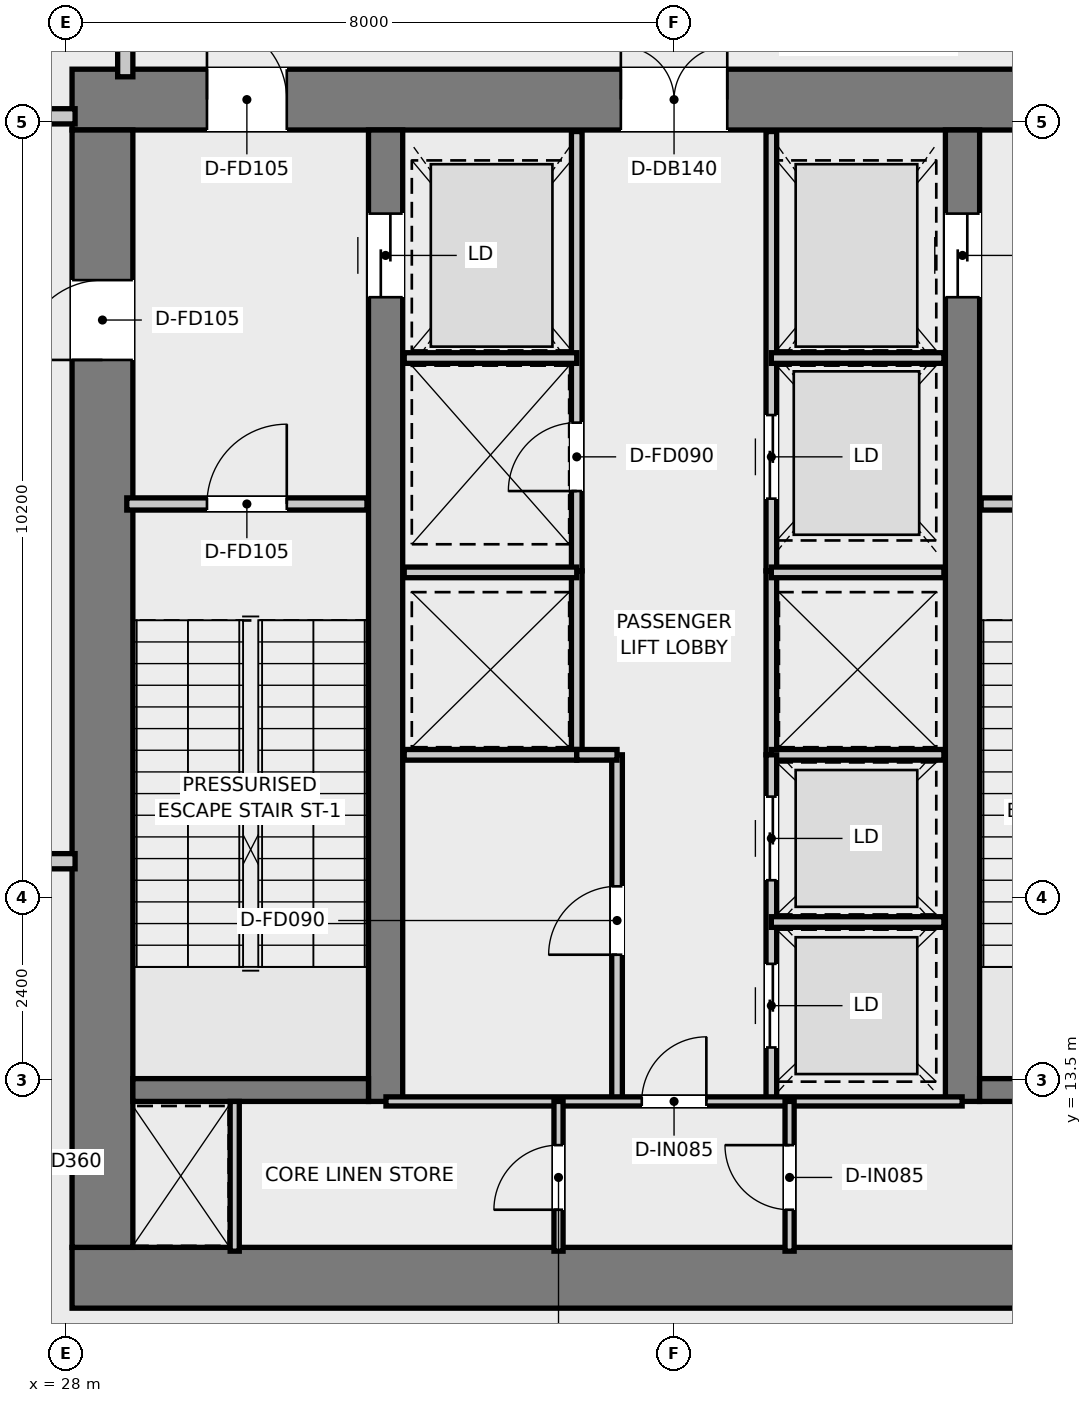
"""IFC4 building model, lengths in metres.
Left out: names, types, materials, properties, quantities, classifications, styles, units other than length and angle.
Written with IfcOpenShell. Run it as: python <this file> out.ifc"""

import sys

from ifc_helpers import new_model, si_unit, direction, frame, frame_2d, origin, place, context, subcontext, project, spatial, rectangle, extrude, element, fill, save


model = new_model("IFC4")
c1 = context("Model", 3, precision=1e-05, world=origin(), true_north=direction((0.0, 1.0)))
c2 = subcontext(c1, "Body", "Model", "MODEL_VIEW")
j1 = project(units=[si_unit("LENGTHUNIT", "METRE"), si_unit("PLANEANGLEUNIT", "RADIAN")], contexts=[c1])
p1 = place(None, origin())
s1 = spatial("IfcSite", under=j1, at=p1, CompositionType="ELEMENT")
p2 = place(p1, origin())
s2 = spatial("IfcBuilding", under=s1, at=p2, CompositionType="ELEMENT")
p3 = place(p2, frame((0.0, 0.0, 201.5)))
s3 = spatial("IfcBuildingStorey", under=s2, at=p3, CompositionType="ELEMENT", Elevation=201.5)
p4 = place(p3, frame((28.08, 10.9, 0.0), z_axis=(0.0, 0.0, 1.0), x_axis=(1.0, 0.0, 0.0)))
e1 = element("IfcWall", 1, at=p4, inside=s3, PredefinedType="SHEAR", context=c2, shape_type="SweptSolid", body=[
    extrude(rectangle(XDim=15.84, YDim=0.8, at=frame_2d((7.92, 0.0))), origin(), (0.0, 0.0, 1.0), 5.8),
])
p5 = place(p3, frame((28.08, 26.4, 0.0), z_axis=(0.0, 0.0, 1.0), x_axis=(1.0, 0.0, 0.0)))
e2 = element("IfcWall", 2, at=p5, inside=s3, PredefinedType="SHEAR", context=c2, shape_type="SweptSolid", body=[
    extrude(rectangle(XDim=15.84, YDim=0.8, at=frame_2d((7.92, 0.0))), origin(), (0.0, 0.0, 1.0), 5.8),
])
p6 = place(p5, frame((7.22, 0.0, 0.0)))
e3 = element("IfcOpeningElement", 3, at=p6, cuts=e2, PredefinedType="OPENING", context=c2, shape_type="SweptSolid", body=[
    extrude(rectangle(XDim=1.4, YDim=2.2, at=frame_2d((0.7, 1.1))), frame((0.0, 0.41, 0.0), z_axis=(0.0, -1.0, 0.0), x_axis=(1.0, 0.0, 0.0)), (0.0, 0.0, 1.0), 0.82),
])
p7 = place(p5, frame((1.775, 0.0, 0.0)))
e4 = element("IfcOpeningElement", 4, at=p7, cuts=e2, PredefinedType="OPENING", context=c2, shape_type="SweptSolid", body=[
    extrude(rectangle(XDim=1.05, YDim=2.1, at=frame_2d((0.525, 1.05))), frame((0.0, 0.41, 0.0), z_axis=(0.0, -1.0, 0.0), x_axis=(1.0, 0.0, 0.0)), (0.0, 0.0, 1.0), 0.82),
])
p8 = place(p5, frame((13.015, 0.0, 0.0)))
e5 = element("IfcOpeningElement", 5, at=p8, cuts=e2, PredefinedType="OPENING", context=c2, shape_type="SweptSolid", body=[
    extrude(rectangle(XDim=1.05, YDim=2.1, at=frame_2d((0.525, 1.05))), frame((0.0, 0.41, 0.0), z_axis=(0.0, -1.0, 0.0), x_axis=(1.0, 0.0, 0.0)), (0.0, 0.0, 1.0), 0.82),
])
p9 = place(p3, frame((28.48, 11.3, 0.0), z_axis=(0.0, 0.0, 1.0), x_axis=(0.0, 1.0, 0.0)))
e6 = element("IfcWall", 6, at=p9, inside=s3, PredefinedType="SHEAR", context=c2, shape_type="SweptSolid", body=[
    extrude(rectangle(XDim=14.7, YDim=0.8, at=frame_2d((7.35, 0.0))), origin(), (0.0, 0.0, 1.0), 5.8),
])
p10 = place(p9, frame((11.675, 0.0, 0.0)))
e7 = element("IfcOpeningElement", 7, at=p10, cuts=e6, PredefinedType="OPENING", context=c2, shape_type="SweptSolid", body=[
    extrude(rectangle(XDim=1.05, YDim=2.1, at=frame_2d((0.525, 1.05))), frame((0.0, 0.41, 0.0), z_axis=(0.0, -1.0, 0.0), x_axis=(1.0, 0.0, 0.0)), (0.0, 0.0, 1.0), 0.82),
])
p11 = place(p3, frame((32.205, 13.22, 0.0), z_axis=(0.0, 0.0, 1.0), x_axis=(0.0, 1.0, 0.0)))
e8 = element("IfcWall", 8, at=p11, inside=s3, PredefinedType="SHEAR", context=c2, shape_type="SweptSolid", body=[
    extrude(rectangle(XDim=12.78, YDim=0.45, at=frame_2d((6.39, 0.0))), origin(), (0.0, 0.0, 1.0), 5.8),
])
p12 = place(p11, frame((10.58, 0.0, 0.0)))
e9 = element("IfcOpeningElement", 9, at=p12, cuts=e8, PredefinedType="OPENING", context=c2, shape_type="SweptSolid", body=[
    extrude(rectangle(XDim=1.1, YDim=2.15, at=frame_2d((0.55, 1.075))), frame((0.0, 0.235, 0.0), z_axis=(0.0, -1.0, 0.0), x_axis=(1.0, 0.0, 0.0)), (0.0, 0.0, 1.0), 0.47),
])
p13 = place(p3, frame((39.795, 13.22, 0.0), z_axis=(0.0, 0.0, 1.0), x_axis=(0.0, 1.0, 0.0)))
e10 = element("IfcWall", 10, at=p13, inside=s3, PredefinedType="SHEAR", context=c2, shape_type="SweptSolid", body=[
    extrude(rectangle(XDim=12.78, YDim=0.45, at=frame_2d((6.39, 0.0))), origin(), (0.0, 0.0, 1.0), 5.8),
])
p14 = place(p13, frame((10.58, 0.0, 0.0)))
e11 = element("IfcOpeningElement", 11, at=p14, cuts=e10, PredefinedType="OPENING", context=c2, shape_type="SweptSolid", body=[
    extrude(rectangle(XDim=1.1, YDim=2.15, at=frame_2d((0.55, 1.075))), frame((0.0, 0.235, 0.0), z_axis=(0.0, -1.0, 0.0), x_axis=(1.0, 0.0, 0.0)), (0.0, 0.0, 1.0), 0.47),
])
for number, where, z_axis, x_axis in (
    (12, (28.88, 13.37, 0.0), (0.0, 0.0, 1.0), (1.0, 0.0, 0.0)),
    (13, (40.02, 13.37, 0.0), (0.0, 0.0, 1.0), (1.0, 0.0, 0.0)),
):
    element("IfcWall", number, at=place(p3, frame(where, z_axis=z_axis, x_axis=x_axis)), inside=s3, PredefinedType="SHEAR", context=c2, shape_type="SweptSolid", body=[
        extrude(rectangle(XDim=3.1, YDim=0.3, at=frame_2d((1.55, 0.0))), origin(), (0.0, 0.0, 1.0), 5.8),
    ])
p15 = place(p3, frame((28.8, 21.08, 0.0), z_axis=(0.0, 0.0, 1.0), x_axis=(1.0, 0.0, 0.0)))
e14 = element("IfcWall", 14, at=p15, inside=s3, PredefinedType="PARTITIONING", context=c2, shape_type="SweptSolid", body=[
    extrude(rectangle(XDim=3.16, YDim=0.16, at=frame_2d((1.58, 0.0))), origin(), (0.0, 0.0, 1.0), 5.52),
])
p16 = place(p15, frame((1.055, 0.0, 0.0)))
e15 = element("IfcOpeningElement", 15, at=p16, cuts=e14, PredefinedType="OPENING", context=c2, shape_type="SweptSolid", body=[
    extrude(rectangle(XDim=1.05, YDim=2.1, at=frame_2d((0.525, 1.05))), frame((0.0, 0.09, 0.0), z_axis=(0.0, -1.0, 0.0), x_axis=(1.0, 0.0, 0.0)), (0.0, 0.0, 1.0), 0.18),
])
p17 = place(p3, frame((40.04, 21.08, 0.0), z_axis=(0.0, 0.0, 1.0), x_axis=(1.0, 0.0, 0.0)))
e16 = element("IfcWall", 16, at=p17, inside=s3, PredefinedType="PARTITIONING", context=c2, shape_type="SweptSolid", body=[
    extrude(rectangle(XDim=3.16, YDim=0.16, at=frame_2d((1.58, 0.0))), origin(), (0.0, 0.0, 1.0), 5.52),
])
p18 = place(p17, frame((1.055, 0.0, 0.0)))
e17 = element("IfcOpeningElement", 17, at=p18, cuts=e16, PredefinedType="OPENING", context=c2, shape_type="SweptSolid", body=[
    extrude(rectangle(XDim=1.05, YDim=2.1, at=frame_2d((0.525, 1.05))), frame((0.0, 0.09, 0.0), z_axis=(0.0, -1.0, 0.0), x_axis=(1.0, 0.0, 0.0)), (0.0, 0.0, 1.0), 0.18),
])
p19 = place(p3, frame((34.72, 20.2, 0.0), z_axis=(0.0, 0.0, 1.0), x_axis=(0.0, 1.0, 0.0)))
e18 = element("IfcWall", 18, at=p19, inside=s3, PredefinedType="PARTITIONING", context=c2, shape_type="SweptSolid", body=[
    extrude(rectangle(XDim=5.78, YDim=0.14, at=frame_2d((2.89, 0.0))), origin(), (0.0, 0.0, 1.0), 4.52),
])
p20 = place(p19, frame((1.05, 0.0, 0.0)))
e19 = element("IfcOpeningElement", 19, at=p20, cuts=e18, PredefinedType="OPENING", context=c2, shape_type="SweptSolid", body=[
    extrude(rectangle(XDim=0.9, YDim=2.1, at=frame_2d((0.45, 1.05))), frame((0.0, 0.08, 0.0), z_axis=(0.0, -1.0, 0.0), x_axis=(1.0, 0.0, 0.0)), (0.0, 0.0, 1.0), 0.16),
])
p21 = place(p3, frame((37.28, 20.2, 0.0), z_axis=(0.0, 0.0, 1.0), x_axis=(0.0, 1.0, 0.0)))
e20 = element("IfcWall", 20, at=p21, inside=s3, PredefinedType="PARTITIONING", context=c2, shape_type="SweptSolid", body=[
    extrude(rectangle(XDim=5.78, YDim=0.14, at=frame_2d((2.89, 0.0))), origin(), (0.0, 0.0, 1.0), 4.52),
])
p22 = place(p21, frame((0.95, 0.0, 0.0)))
e21 = element("IfcOpeningElement", 21, at=p22, cuts=e20, PredefinedType="OPENING", context=c2, shape_type="SweptSolid", body=[
    extrude(rectangle(XDim=1.1, YDim=2.15, at=frame_2d((0.55, 1.075))), frame((0.0, 0.08, 0.0), z_axis=(0.0, -1.0, 0.0), x_axis=(1.0, 0.0, 0.0)), (0.0, 0.0, 1.0), 0.16),
])
for number, where, z_axis, x_axis in (
    (22, (32.45, 23.0, 0.0), (0.0, 0.0, 1.0), (1.0, 0.0, 0.0)),
    (23, (37.28, 23.0, 0.0), (0.0, 0.0, 1.0), (1.0, 0.0, 0.0)),
):
    element("IfcWall", number, at=place(p3, frame(where, z_axis=z_axis, x_axis=x_axis)), inside=s3, PredefinedType="PARTITIONING", context=c2, shape_type="SweptSolid", body=[
        extrude(rectangle(XDim=2.27, YDim=0.14, at=frame_2d((1.135, 0.0))), origin(), (0.0, 0.0, 1.0), 4.52),
    ])
for number, where, z_axis, x_axis in (
    (24, (34.72, 17.78, 0.0), (0.0, 0.0, 1.0), (0.0, 1.0, 0.0)),
    (25, (37.28, 17.78, 0.0), (0.0, 0.0, 1.0), (0.0, 1.0, 0.0)),
):
    element("IfcWall", number, at=place(p3, frame(where, z_axis=z_axis, x_axis=x_axis)), inside=s3, PredefinedType="PARTITIONING", context=c2, shape_type="SweptSolid", body=[
        extrude(rectangle(XDim=2.42, YDim=0.14, at=frame_2d((1.21, 0.0))), origin(), (0.0, 0.0, 1.0), 5.52),
    ])
for number, where, z_axis, x_axis in (
    (26, (32.45, 17.78, 0.0), (0.0, 0.0, 1.0), (1.0, 0.0, 0.0)),
    (27, (32.45, 20.18, 0.0), (0.0, 0.0, 1.0), (1.0, 0.0, 0.0)),
    (28, (37.28, 17.78, 0.0), (0.0, 0.0, 1.0), (1.0, 0.0, 0.0)),
    (29, (37.28, 20.18, 0.0), (0.0, 0.0, 1.0), (1.0, 0.0, 0.0)),
):
    element("IfcWall", number, at=place(p3, frame(where, z_axis=z_axis, x_axis=x_axis)), inside=s3, PredefinedType="PARTITIONING", context=c2, shape_type="SweptSolid", body=[
        extrude(rectangle(XDim=2.27, YDim=0.14, at=frame_2d((1.135, 0.0))), origin(), (0.0, 0.0, 1.0), 5.52),
    ])
p23 = place(p3, frame((35.25, 13.22, 0.0), z_axis=(0.0, 0.0, 1.0), x_axis=(0.0, 1.0, 0.0)))
e30 = element("IfcWall", 30, at=p23, inside=s3, PredefinedType="PARTITIONING", context=c2, shape_type="SweptSolid", body=[
    extrude(rectangle(XDim=4.56, YDim=0.14, at=frame_2d((2.28, 0.0))), origin(), (0.0, 0.0, 1.0), 5.52),
])
p24 = place(p23, frame((1.93, 0.0, 0.0)))
e31 = element("IfcOpeningElement", 31, at=p24, cuts=e30, PredefinedType="OPENING", context=c2, shape_type="SweptSolid", body=[
    extrude(rectangle(XDim=0.9, YDim=2.1, at=frame_2d((0.45, 1.05))), frame((0.0, 0.08, 0.0), z_axis=(0.0, -1.0, 0.0), x_axis=(1.0, 0.0, 0.0)), (0.0, 0.0, 1.0), 0.16),
])
p25 = place(p3, frame((34.72, 17.78, 0.0), z_axis=(0.0, 0.0, 1.0), x_axis=(1.0, 0.0, 0.0)))
e32 = element("IfcWall", 32, at=p25, inside=s3, PredefinedType="PARTITIONING", context=c2, shape_type="SweptSolid", body=[
    extrude(rectangle(XDim=0.53, YDim=0.14, at=frame_2d((0.265, 0.0))), origin(), (0.0, 0.0, 1.0), 5.52),
])
p26 = place(p3, frame((37.28, 13.22, 0.0), z_axis=(0.0, 0.0, 1.0), x_axis=(0.0, 1.0, 0.0)))
e33 = element("IfcWall", 33, at=p26, inside=s3, PredefinedType="PARTITIONING", context=c2, shape_type="SweptSolid", body=[
    extrude(rectangle(XDim=4.56, YDim=0.14, at=frame_2d((2.28, 0.0))), origin(), (0.0, 0.0, 1.0), 5.52),
])
p27 = place(p26, frame((0.71, 0.0, 0.0)))
e34 = element("IfcOpeningElement", 34, at=p27, cuts=e33, PredefinedType="OPENING", context=c2, shape_type="SweptSolid", body=[
    extrude(rectangle(XDim=1.1, YDim=2.15, at=frame_2d((0.55, 1.075))), frame((0.0, 0.08, 0.0), z_axis=(0.0, -1.0, 0.0), x_axis=(1.0, 0.0, 0.0)), (0.0, 0.0, 1.0), 0.16),
])
p28 = place(p26, frame((2.91, 0.0, 0.0)))
e35 = element("IfcOpeningElement", 35, at=p28, cuts=e33, PredefinedType="OPENING", context=c2, shape_type="SweptSolid", body=[
    extrude(rectangle(XDim=1.1, YDim=2.15, at=frame_2d((0.55, 1.075))), frame((0.0, 0.08, 0.0), z_axis=(0.0, -1.0, 0.0), x_axis=(1.0, 0.0, 0.0)), (0.0, 0.0, 1.0), 0.16),
])
p29 = place(p3, frame((37.28, 15.58, 0.0), z_axis=(0.0, 0.0, 1.0), x_axis=(1.0, 0.0, 0.0)))
e36 = element("IfcWall", 36, at=p29, inside=s3, PredefinedType="PARTITIONING", context=c2, shape_type="SweptSolid", body=[
    extrude(rectangle(XDim=2.27, YDim=0.14, at=frame_2d((1.135, 0.0))), origin(), (0.0, 0.0, 1.0), 5.52),
])
p30 = place(p3, frame((30.22, 11.25, 0.0), z_axis=(0.0, 0.0, 1.0), x_axis=(0.0, 1.0, 0.0)))
e37 = element("IfcWall", 37, at=p30, inside=s3, PredefinedType="PARTITIONING", context=c2, shape_type="SweptSolid", body=[
    extrude(rectangle(XDim=1.97, YDim=0.12, at=frame_2d((0.985, 0.0))), origin(), (0.0, 0.0, 1.0), 5.52),
])
p31 = place(p3, frame((32.21, 13.22, 0.0), z_axis=(0.0, 0.0, 1.0), x_axis=(1.0, 0.0, 0.0)))
e38 = element("IfcWall", 38, at=p31, inside=s3, PredefinedType="PARTITIONING", context=c2, shape_type="SweptSolid", body=[
    extrude(rectangle(XDim=7.58, YDim=0.12, at=frame_2d((3.79, 0.0))), origin(), (0.0, 0.0, 1.0), 5.52),
])
p32 = place(p31, frame((3.365, 0.0, 0.0)))
e39 = element("IfcOpeningElement", 39, at=p32, cuts=e38, PredefinedType="OPENING", context=c2, shape_type="SweptSolid", body=[
    extrude(rectangle(XDim=0.85, YDim=2.1, at=frame_2d((0.425, 1.05))), frame((0.0, 0.07, 0.0), z_axis=(0.0, -1.0, 0.0), x_axis=(1.0, 0.0, 0.0)), (0.0, 0.0, 1.0), 0.14),
])
p33 = place(p3, frame((34.48, 11.25, 0.0), z_axis=(0.0, 0.0, 1.0), x_axis=(0.0, 1.0, 0.0)))
e40 = element("IfcWall", 40, at=p33, inside=s3, PredefinedType="PARTITIONING", context=c2, shape_type="SweptSolid", body=[
    extrude(rectangle(XDim=1.97, YDim=0.12, at=frame_2d((0.985, 0.0))), origin(), (0.0, 0.0, 1.0), 5.52),
])
p34 = place(p33, frame((0.545, 0.0, 0.0)))
e41 = element("IfcOpeningElement", 41, at=p34, cuts=e40, PredefinedType="OPENING", context=c2, shape_type="SweptSolid", body=[
    extrude(rectangle(XDim=0.85, YDim=2.1, at=frame_2d((0.425, 1.05))), frame((0.0, 0.07, 0.0), z_axis=(0.0, -1.0, 0.0), x_axis=(1.0, 0.0, 0.0)), (0.0, 0.0, 1.0), 0.14),
])
p35 = place(p3, frame((37.52, 11.25, 0.0), z_axis=(0.0, 0.0, 1.0), x_axis=(0.0, 1.0, 0.0)))
e42 = element("IfcWall", 42, at=p35, inside=s3, PredefinedType="PARTITIONING", context=c2, shape_type="SweptSolid", body=[
    extrude(rectangle(XDim=1.97, YDim=0.12, at=frame_2d((0.985, 0.0))), origin(), (0.0, 0.0, 1.0), 5.52),
])
p36 = place(p35, frame((0.545, 0.0, 0.0)))
e43 = element("IfcOpeningElement", 43, at=p36, cuts=e42, PredefinedType="OPENING", context=c2, shape_type="SweptSolid", body=[
    extrude(rectangle(XDim=0.85, YDim=2.1, at=frame_2d((0.425, 1.05))), frame((0.0, 0.07, 0.0), z_axis=(0.0, -1.0, 0.0), x_axis=(1.0, 0.0, 0.0)), (0.0, 0.0, 1.0), 0.14),
])
p37 = place(p3, frame((28.78, 26.7, 0.0), z_axis=(0.0, 0.0, 1.0), x_axis=(0.0, 1.0, 0.0)))
e44 = element("IfcWall", 44, at=p37, inside=s3, PredefinedType="SOLIDWALL", context=c2, shape_type="SweptSolid", body=[
    extrude(rectangle(XDim=12.6, YDim=0.2, at=frame_2d((6.3, 0.0))), origin(), (0.0, 0.0, 1.0), 4.88),
])
p38 = place(p3, frame((22.05, 16.38, 0.0), z_axis=(0.0, 0.0, 1.0), x_axis=(1.0, 0.0, 0.0)))
e45 = element("IfcWall", 45, at=p38, inside=s3, PredefinedType="SOLIDWALL", context=c2, shape_type="SweptSolid", body=[
    extrude(rectangle(XDim=6.07, YDim=0.2, at=frame_2d((3.035, 0.0))), origin(), (0.0, 0.0, 1.0), 4.88),
])
p39 = place(p3, frame((24.58, 26.18, 0.0), z_axis=(0.0, 0.0, 1.0), x_axis=(1.0, 0.0, 0.0)))
e46 = element("IfcWall", 46, at=p39, inside=s3, PredefinedType="SOLIDWALL", context=c2, shape_type="SweptSolid", body=[
    extrude(rectangle(XDim=3.54, YDim=0.2, at=frame_2d((1.77, 0.0))), origin(), (0.0, 0.0, 1.0), 4.88),
])
p40 = place(p16, origin())
e47 = element("IfcDoor", 47, at=p40, inside=s3, OperationType="SINGLE_SWING_RIGHT", PredefinedType="DOOR", context=c2, shape_type="SweptSolid", body=[
    extrude(rectangle(XDim=1.05, YDim=2.1, at=frame_2d((0.525, 1.05))), frame((0.0, 0.025, 0.0), z_axis=(0.0, -1.0, 0.0), x_axis=(1.0, 0.0, 0.0)), (0.0, 0.0, 1.0), 0.05),
])
fill(e15, e47)
p41 = place(p6, origin())
e48 = element("IfcDoor", 48, at=p41, inside=s3, OperationType="DOUBLE_DOOR_SINGLE_SWING", PredefinedType="DOOR", context=c2, shape_type="SweptSolid", body=[
    extrude(rectangle(XDim=1.4, YDim=2.2, at=frame_2d((0.7, 1.1))), frame((0.0, 0.025, 0.0), z_axis=(0.0, -1.0, 0.0), x_axis=(1.0, 0.0, 0.0)), (0.0, 0.0, 1.0), 0.05),
])
fill(e3, e48)
p42 = place(p7, origin())
e49 = element("IfcDoor", 49, at=p42, inside=s3, OperationType="SINGLE_SWING_LEFT", PredefinedType="DOOR", context=c2, shape_type="SweptSolid", body=[
    extrude(rectangle(XDim=1.05, YDim=2.1, at=frame_2d((0.525, 1.05))), frame((0.0, 0.025, 0.0), z_axis=(0.0, -1.0, 0.0), x_axis=(1.0, 0.0, 0.0)), (0.0, 0.0, 1.0), 0.05),
])
fill(e4, e49)
p43 = place(p10, origin())
e50 = element("IfcDoor", 50, at=p43, inside=s3, OperationType="SINGLE_SWING_LEFT", PredefinedType="DOOR", context=c2, shape_type="SweptSolid", body=[
    extrude(rectangle(XDim=1.05, YDim=2.1, at=frame_2d((0.525, 1.05))), frame((0.0, 0.025, 0.0), z_axis=(0.0, -1.0, 0.0), x_axis=(1.0, 0.0, 0.0)), (0.0, 0.0, 1.0), 0.05),
])
fill(e7, e50)
p44 = place(p12, origin())
e51 = element("IfcDoor", 51, at=p44, inside=s3, OperationType="DOUBLE_DOOR_SLIDING", PredefinedType="DOOR", context=c2, shape_type="SweptSolid", body=[
    extrude(rectangle(XDim=1.1, YDim=2.15, at=frame_2d((0.55, 1.075))), frame((0.0, 0.025, 0.0), z_axis=(0.0, -1.0, 0.0), x_axis=(1.0, 0.0, 0.0)), (0.0, 0.0, 1.0), 0.05),
])
fill(e9, e51)
p45 = place(p14, origin())
e52 = element("IfcDoor", 52, at=p45, inside=s3, OperationType="DOUBLE_DOOR_SLIDING", PredefinedType="DOOR", context=c2, shape_type="SweptSolid", body=[
    extrude(rectangle(XDim=1.1, YDim=2.15, at=frame_2d((0.55, 1.075))), frame((0.0, 0.025, 0.0), z_axis=(0.0, -1.0, 0.0), x_axis=(1.0, 0.0, 0.0)), (0.0, 0.0, 1.0), 0.05),
])
fill(e11, e52)
p46 = place(p20, origin())
e53 = element("IfcDoor", 53, at=p46, inside=s3, OperationType="SINGLE_SWING_LEFT", PredefinedType="DOOR", context=c2, shape_type="SweptSolid", body=[
    extrude(rectangle(XDim=0.9, YDim=2.1, at=frame_2d((0.45, 1.05))), frame((0.0, 0.025, 0.0), z_axis=(0.0, -1.0, 0.0), x_axis=(1.0, 0.0, 0.0)), (0.0, 0.0, 1.0), 0.05),
])
fill(e19, e53)
p47 = place(p22, origin())
e54 = element("IfcDoor", 54, at=p47, inside=s3, OperationType="DOUBLE_DOOR_SLIDING", PredefinedType="DOOR", context=c2, shape_type="SweptSolid", body=[
    extrude(rectangle(XDim=1.1, YDim=2.15, at=frame_2d((0.55, 1.075))), frame((0.0, 0.025, 0.0), z_axis=(0.0, -1.0, 0.0), x_axis=(1.0, 0.0, 0.0)), (0.0, 0.0, 1.0), 0.05),
])
fill(e21, e54)
p48 = place(p24, origin())
e55 = element("IfcDoor", 55, at=p48, inside=s3, OperationType="SINGLE_SWING_LEFT", PredefinedType="DOOR", context=c2, shape_type="SweptSolid", body=[
    extrude(rectangle(XDim=0.9, YDim=2.1, at=frame_2d((0.45, 1.05))), frame((0.0, 0.025, 0.0), z_axis=(0.0, -1.0, 0.0), x_axis=(1.0, 0.0, 0.0)), (0.0, 0.0, 1.0), 0.05),
])
fill(e31, e55)
p49 = place(p27, origin())
e56 = element("IfcDoor", 56, at=p49, inside=s3, OperationType="DOUBLE_DOOR_SLIDING", PredefinedType="DOOR", context=c2, shape_type="SweptSolid", body=[
    extrude(rectangle(XDim=1.1, YDim=2.15, at=frame_2d((0.55, 1.075))), frame((0.0, 0.025, 0.0), z_axis=(0.0, -1.0, 0.0), x_axis=(1.0, 0.0, 0.0)), (0.0, 0.0, 1.0), 0.05),
])
fill(e34, e56)
p50 = place(p28, origin())
e57 = element("IfcDoor", 57, at=p50, inside=s3, OperationType="DOUBLE_DOOR_SLIDING", PredefinedType="DOOR", context=c2, shape_type="SweptSolid", body=[
    extrude(rectangle(XDim=1.1, YDim=2.15, at=frame_2d((0.55, 1.075))), frame((0.0, 0.025, 0.0), z_axis=(0.0, -1.0, 0.0), x_axis=(1.0, 0.0, 0.0)), (0.0, 0.0, 1.0), 0.05),
])
fill(e35, e57)
p51 = place(p32, origin())
e58 = element("IfcDoor", 58, at=p51, inside=s3, OperationType="SINGLE_SWING_RIGHT", PredefinedType="DOOR", context=c2, shape_type="SweptSolid", body=[
    extrude(rectangle(XDim=0.85, YDim=2.1, at=frame_2d((0.425, 1.05))), frame((0.0, 0.025, 0.0), z_axis=(0.0, -1.0, 0.0), x_axis=(1.0, 0.0, 0.0)), (0.0, 0.0, 1.0), 0.05),
])
fill(e39, e58)
p52 = place(p34, origin())
e59 = element("IfcDoor", 59, at=p52, inside=s3, OperationType="SINGLE_SWING_LEFT", PredefinedType="DOOR", context=c2, shape_type="SweptSolid", body=[
    extrude(rectangle(XDim=0.85, YDim=2.1, at=frame_2d((0.425, 1.05))), frame((0.0, 0.025, 0.0), z_axis=(0.0, -1.0, 0.0), x_axis=(1.0, 0.0, 0.0)), (0.0, 0.0, 1.0), 0.05),
])
fill(e41, e59)
p53 = place(p36, origin())
e60 = element("IfcDoor", 60, at=p53, inside=s3, OperationType="SINGLE_SWING_RIGHT", PredefinedType="DOOR", context=c2, shape_type="SweptSolid", body=[
    extrude(rectangle(XDim=0.85, YDim=2.1, at=frame_2d((0.425, 1.05))), frame((0.0, 0.025, 0.0), z_axis=(0.0, -1.0, 0.0), x_axis=(1.0, 0.0, 0.0)), (0.0, 0.0, 1.0), 0.05),
])
fill(e43, e60)
save(model, sys.argv[1])
